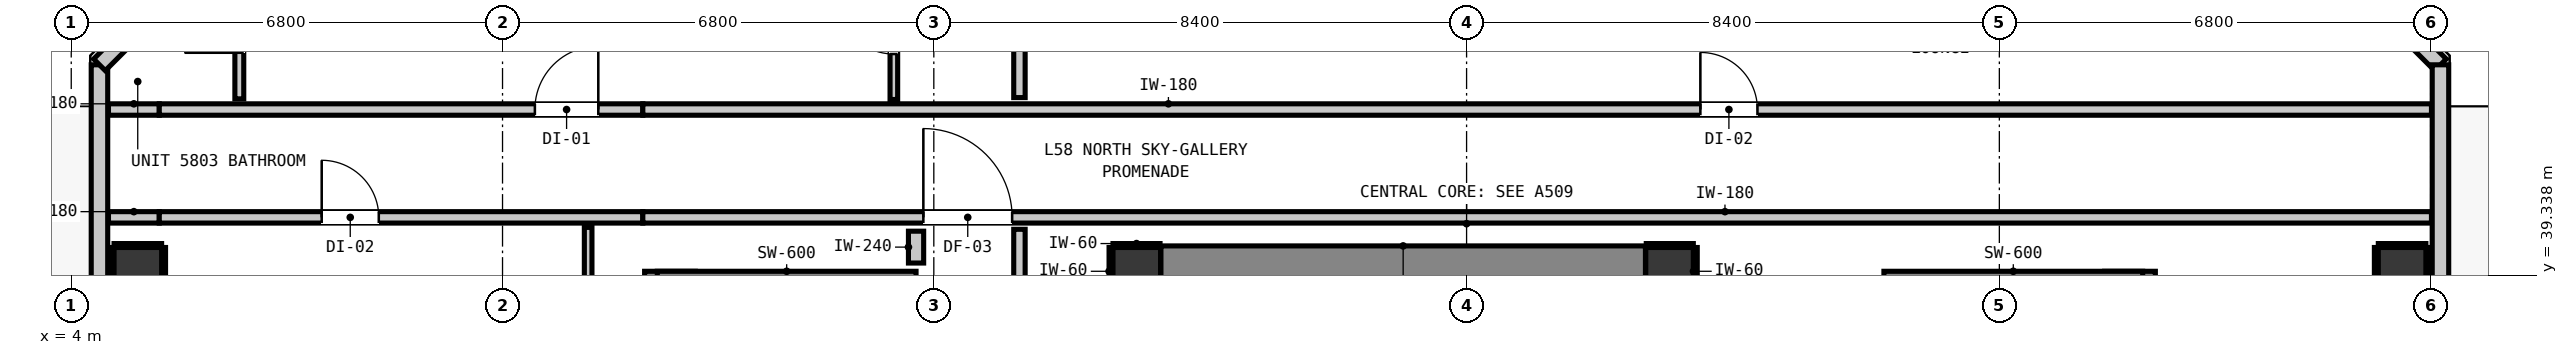
"""IFC4 building model, lengths in metres.
Left out: names, types, materials, properties, quantities, classifications, styles, units other than length and angle.
Written with IfcOpenShell. Run it as: python <this file> out.ifc"""

import sys

from ifc_helpers import new_model, si_unit, direction, frame, frame_2d, origin, origin_2d, place, context, subcontext, project, spatial, rectangle, extrude, element, fill, save


model = new_model("IFC4")
c1 = context("Model", 3, precision=1e-05, world=origin(), true_north=direction((0.0, 1.0)))
c2 = subcontext(c1, "Body", "Model", "MODEL_VIEW")
j1 = project(units=[si_unit("LENGTHUNIT", "METRE"), si_unit("PLANEANGLEUNIT", "RADIAN")], contexts=[c1])
p1 = place(None, origin())
s1 = spatial("IfcSite", under=j1, at=p1, CompositionType="ELEMENT")
p2 = place(p1, origin())
s2 = spatial("IfcBuilding", under=s1, at=p2, CompositionType="ELEMENT")
p3 = place(p2, frame((0.0, 0.0, 200.12)))
s3 = spatial("IfcBuildingStorey", under=s2, at=p3, CompositionType="ELEMENT", Elevation=200.12)
for number, where, z_axis, x_axis in (
    (1, (20.8, 39.4, 0.0), (0.0, 0.0, 1.0), (1.0, 0.0, 0.0)),
    (2, (29.2, 39.4, 0.0), (0.0, 0.0, 1.0), (1.0, 0.0, 0.0)),
):
    element("IfcColumn", number, at=place(p3, frame(where, z_axis=z_axis, x_axis=x_axis)), inside=s3, PredefinedType="COLUMN", context=c2, shape_type="SweptSolid", body=[
        extrude(rectangle(XDim=0.75, YDim=0.75, at=origin_2d()), origin(), (0.0, 0.0, 1.0), 3.32),
    ])
p4 = place(p3, frame((13.44, 31.08, 0.0), z_axis=(0.0, 0.0, 1.0), x_axis=(0.0, 1.0, 0.0)))
e3 = element("IfcWall", 3, at=p4, inside=s3, PredefinedType="SHEAR", context=c2, shape_type="SweptSolid", body=[
    extrude(rectangle(XDim=8.32, YDim=0.8, at=frame_2d((4.16, 0.0))), origin(), (0.0, 0.0, 1.0), 3.32),
])
p5 = place(p3, frame((13.24, 39.1, 0.0), z_axis=(0.0, 0.0, 1.0), x_axis=(1.0, 0.0, 0.0)))
e4 = element("IfcWall", 4, at=p5, inside=s3, PredefinedType="SHEAR", context=c2, shape_type="SweptSolid", body=[
    extrude(rectangle(XDim=4.08, YDim=0.6, at=frame_2d((2.04, 0.0))), origin(), (0.0, 0.0, 1.0), 3.32),
])
p6 = place(p3, frame((36.46, 31.08, 0.0), z_axis=(0.0, 0.0, 1.0), x_axis=(0.0, 1.0, 0.0)))
e5 = element("IfcWall", 5, at=p6, inside=s3, PredefinedType="SHEAR", context=c2, shape_type="SweptSolid", body=[
    extrude(rectangle(XDim=8.32, YDim=0.8, at=frame_2d((4.16, 0.0))), origin(), (0.0, 0.0, 1.0), 3.32),
])
p7 = place(p3, frame((32.58, 39.1, 0.0), z_axis=(0.0, 0.0, 1.0), x_axis=(1.0, 0.0, 0.0)))
e6 = element("IfcWall", 6, at=p7, inside=s3, PredefinedType="SHEAR", context=c2, shape_type="SweptSolid", body=[
    extrude(rectangle(XDim=4.08, YDim=0.6, at=frame_2d((2.04, 0.0))), origin(), (0.0, 0.0, 1.0), 3.32),
])
p8 = place(p3, frame((21.18, 39.4, 0.0), z_axis=(0.0, 0.0, 1.0), x_axis=(1.0, 0.0, 0.0)))
e7 = element("IfcWall", 7, at=p8, inside=s3, PredefinedType="SHEAR", context=c2, shape_type="SweptSolid", body=[
    extrude(rectangle(XDim=7.64, YDim=0.8, at=frame_2d((3.82, 0.0))), origin(), (0.0, 0.0, 1.0), 3.32),
])
for number, where, z_axis, x_axis in (
    (8, (5.05, 39.4, 0.0), (0.0, 0.0, 1.0), (1.0, 0.0, 0.0)),
    (9, (40.75, 39.4, 0.0), (0.0, 0.0, 1.0), (1.0, 0.0, 0.0)),
):
    element("IfcColumn", number, at=place(p3, frame(where, z_axis=z_axis, x_axis=x_axis)), inside=s3, PredefinedType="COLUMN", context=c2, shape_type="SweptSolid", body=[
        extrude(rectangle(XDim=0.75, YDim=0.75, at=origin_2d()), origin(), (0.0, 0.0, 1.0), 3.32),
    ])
p9 = place(p3, frame((4.445, 12.345, 0.0), z_axis=(0.0, 0.0, 1.0), x_axis=(0.0, 1.0, 0.0)))
e10 = element("IfcWall", 10, at=p9, inside=s3, PredefinedType="STANDARD", context=c2, shape_type="SweptSolid", body=[
    extrude(rectangle(XDim=30.31, YDim=0.26, at=frame_2d((15.155, 0.0))), origin(), (0.0, 0.0, 1.0), 3.1),
])
p10 = place(p9, frame((0.91, 0.0, 0.0)))
e11 = element("IfcOpeningElement", 11, at=p10, cuts=e10, PredefinedType="OPENING", context=c2, shape_type="SweptSolid", body=[
    extrude(rectangle(XDim=1.0, YDim=2.15, at=frame_2d((0.5, 1.075))), frame((0.0, 0.14, 0.0), z_axis=(0.0, -1.0, 0.0), x_axis=(1.0, 0.0, 0.0)), (0.0, 0.0, 1.0), 0.28),
])
p11 = place(p9, frame((2.322, 0.0, 0.85)))
e12 = element("IfcOpeningElement", 12, at=p11, cuts=e10, PredefinedType="OPENING", context=c2, shape_type="SweptSolid", body=[
    extrude(rectangle(XDim=0.58, YDim=1.5, at=frame_2d((0.29, 0.75))), frame((0.0, 0.14, 0.0), z_axis=(0.0, -1.0, 0.0), x_axis=(1.0, 0.0, 0.0)), (0.0, 0.0, 1.0), 0.28),
])
p12 = place(p9, frame((21.205, 0.0, 0.85)))
e13 = element("IfcOpeningElement", 13, at=p12, cuts=e10, PredefinedType="OPENING", context=c2, shape_type="SweptSolid", body=[
    extrude(rectangle(XDim=3.0, YDim=2.1, at=frame_2d((1.5, 1.05))), frame((0.0, 0.14, 0.0), z_axis=(0.0, -1.0, 0.0), x_axis=(1.0, 0.0, 0.0)), (0.0, 0.0, 1.0), 0.28),
])
for number, where, z_axis, x_axis in (
    (14, (4.445, 42.655, 0.0), (0.0, 0.0, 1.0), (0.707, 0.707, 0.0)),
    (15, (39.255, 44.755, 0.0), (0.0, 0.0, 1.0), (0.707, -0.707, 0.0)),
):
    element("IfcWall", number, at=place(p3, frame(where, z_axis=z_axis, x_axis=x_axis)), inside=s3, PredefinedType="STANDARD", context=c2, shape_type="SweptSolid", body=[
        extrude(rectangle(XDim=2.97, YDim=0.26, at=frame_2d((1.485, 0.0))), origin(), (0.0, 0.0, 1.0), 3.1),
    ])
p13 = place(p3, frame((41.355, 42.655, 0.0), z_axis=(0.0, 0.0, 1.0), x_axis=(0.0, -1.0, 0.0)))
e16 = element("IfcWall", 16, at=p13, inside=s3, PredefinedType="STANDARD", context=c2, shape_type="SweptSolid", body=[
    extrude(rectangle(XDim=30.31, YDim=0.26, at=frame_2d((15.155, 0.0))), origin(), (0.0, 0.0, 1.0), 3.1),
])
p14 = place(p13, frame((23.818, 0.0, 0.0)))
e17 = element("IfcOpeningElement", 17, at=p14, cuts=e16, PredefinedType="OPENING", context=c2, shape_type="SweptSolid", body=[
    extrude(rectangle(XDim=1.0, YDim=2.15, at=frame_2d((0.5, 1.075))), frame((0.0, 0.14, 0.0), z_axis=(0.0, -1.0, 0.0), x_axis=(1.0, 0.0, 0.0)), (0.0, 0.0, 1.0), 0.28),
])
p15 = place(p13, frame((25.482, 0.0, 0.85)))
e18 = element("IfcOpeningElement", 18, at=p15, cuts=e16, PredefinedType="OPENING", context=c2, shape_type="SweptSolid", body=[
    extrude(rectangle(XDim=1.05, YDim=1.65, at=frame_2d((0.525, 0.825))), frame((0.0, 0.14, 0.0), z_axis=(0.0, -1.0, 0.0), x_axis=(1.0, 0.0, 0.0)), (0.0, 0.0, 1.0), 0.28),
])
p16 = place(p13, frame((28.183, 0.0, 0.85)))
e19 = element("IfcOpeningElement", 19, at=p16, cuts=e16, PredefinedType="OPENING", context=c2, shape_type="SweptSolid", body=[
    extrude(rectangle(XDim=1.05, YDim=1.65, at=frame_2d((0.525, 0.825))), frame((0.0, 0.14, 0.0), z_axis=(0.0, -1.0, 0.0), x_axis=(1.0, 0.0, 0.0)), (0.0, 0.0, 1.0), 0.28),
])
p17 = place(p3, frame((4.587, 40.25, 0.0), z_axis=(0.0, 0.0, 1.0), x_axis=(1.0, 0.0, 0.0)))
e20 = element("IfcWall", 20, at=p17, inside=s3, PredefinedType="PARTITIONING", context=c2, shape_type="SweptSolid", body=[
    extrude(rectangle(XDim=0.801, YDim=0.18, at=frame_2d((0.4, 0.0))), origin(), (0.0, 0.0, 1.0), 3.1),
])
p18 = place(p3, frame((5.388, 40.25, 0.0), z_axis=(0.0, 0.0, 1.0), x_axis=(1.0, 0.0, 0.0)))
e21 = element("IfcWall", 21, at=p18, inside=s3, PredefinedType="PARTITIONING", context=c2, shape_type="SweptSolid", body=[
    extrude(rectangle(XDim=7.624, YDim=0.18, at=frame_2d((3.812, 0.0))), origin(), (0.0, 0.0, 1.0), 2.477),
])
p19 = place(p18, frame((2.561, 0.0, 0.0)))
e22 = element("IfcOpeningElement", 22, at=p19, cuts=e21, PredefinedType="OPENING", context=c2, shape_type="SweptSolid", body=[
    extrude(rectangle(XDim=0.9, YDim=2.1, at=frame_2d((0.45, 1.05))), frame((0.0, 0.1, 0.0), z_axis=(0.0, -1.0, 0.0), x_axis=(1.0, 0.0, 0.0)), (0.0, 0.0, 1.0), 0.2),
])
p20 = place(p3, frame((13.012, 40.25, 0.0), z_axis=(0.0, 0.0, 1.0), x_axis=(1.0, 0.0, 0.0)))
e23 = element("IfcWall", 23, at=p20, inside=s3, PredefinedType="PARTITIONING", context=c2, shape_type="SweptSolid", body=[
    extrude(rectangle(XDim=28.201, YDim=0.18, at=frame_2d((14.101, 0.0))), origin(), (0.0, 0.0, 1.0), 3.1),
])
p21 = place(p20, frame((4.423, 0.0, 0.0)))
e24 = element("IfcOpeningElement", 24, at=p21, cuts=e23, PredefinedType="OPENING", context=c2, shape_type="SweptSolid", body=[
    extrude(rectangle(XDim=1.4, YDim=2.15, at=frame_2d((0.7, 1.075))), frame((0.0, 0.1, 0.0), z_axis=(0.0, -1.0, 0.0), x_axis=(1.0, 0.0, 0.0)), (0.0, 0.0, 1.0), 0.2),
])
p22 = place(p3, frame((4.587, 41.95, 0.0), z_axis=(0.0, 0.0, 1.0), x_axis=(1.0, 0.0, 0.0)))
e25 = element("IfcWall", 25, at=p22, inside=s3, PredefinedType="PARTITIONING", context=c2, shape_type="SweptSolid", body=[
    extrude(rectangle(XDim=0.801, YDim=0.18, at=frame_2d((0.4, 0.0))), origin(), (0.0, 0.0, 1.0), 3.1),
])
p23 = place(p3, frame((5.388, 41.95, 0.0), z_axis=(0.0, 0.0, 1.0), x_axis=(1.0, 0.0, 0.0)))
e26 = element("IfcWall", 26, at=p23, inside=s3, PredefinedType="PARTITIONING", context=c2, shape_type="SweptSolid", body=[
    extrude(rectangle(XDim=7.624, YDim=0.18, at=frame_2d((3.812, 0.0))), origin(), (0.0, 0.0, 1.0), 2.477),
])
p24 = place(p23, frame((5.922, 0.0, 0.0)))
e27 = element("IfcOpeningElement", 27, at=p24, cuts=e26, PredefinedType="OPENING", context=c2, shape_type="SweptSolid", body=[
    extrude(rectangle(XDim=1.0, YDim=2.15, at=frame_2d((0.5, 1.075))), frame((0.0, 0.1, 0.0), z_axis=(0.0, -1.0, 0.0), x_axis=(1.0, 0.0, 0.0)), (0.0, 0.0, 1.0), 0.2),
])
p25 = place(p3, frame((13.012, 41.95, 0.0), z_axis=(0.0, 0.0, 1.0), x_axis=(1.0, 0.0, 0.0)))
e28 = element("IfcWall", 28, at=p25, inside=s3, PredefinedType="PARTITIONING", context=c2, shape_type="SweptSolid", body=[
    extrude(rectangle(XDim=28.201, YDim=0.18, at=frame_2d((14.101, 0.0))), origin(), (0.0, 0.0, 1.0), 3.1),
])
p26 = place(p25, frame((16.674, 0.0, 0.0)))
e29 = element("IfcOpeningElement", 29, at=p26, cuts=e28, PredefinedType="OPENING", context=c2, shape_type="SweptSolid", body=[
    extrude(rectangle(XDim=0.9, YDim=2.1, at=frame_2d((0.45, 1.05))), frame((0.0, 0.1, 0.0), z_axis=(0.0, -1.0, 0.0), x_axis=(1.0, 0.0, 0.0)), (0.0, 0.0, 1.0), 0.2),
])
p27 = place(p3, frame((17.32, 39.53, 0.0), z_axis=(0.0, 0.0, 1.0), x_axis=(0.0, 1.0, 0.0)))
e30 = element("IfcWall", 30, at=p27, inside=s3, PredefinedType="PARTITIONING", context=c2, shape_type="SweptSolid", body=[
    extrude(rectangle(XDim=0.502, YDim=0.24, at=frame_2d((0.251, 0.0))), origin(), (0.0, 0.0, 1.0), 3.1),
])
p28 = place(p3, frame((18.95, 39.058, 0.0), z_axis=(0.0, 0.0, 1.0), x_axis=(0.0, 1.0, 0.0)))
e31 = element("IfcWall", 31, at=p28, inside=s3, PredefinedType="PARTITIONING", context=c2, shape_type="SweptSolid", body=[
    extrude(rectangle(XDim=1.004, YDim=0.18, at=frame_2d((0.502, 0.0))), origin(), (0.0, 0.0, 1.0), 3.1),
])
p29 = place(p3, frame((18.95, 42.138, 0.0), z_axis=(0.0, 0.0, 1.0), x_axis=(0.0, 1.0, 0.0)))
e32 = element("IfcWall", 32, at=p29, inside=s3, PredefinedType="PARTITIONING", context=c2, shape_type="SweptSolid", body=[
    extrude(rectangle(XDim=2.475, YDim=0.18, at=frame_2d((1.238, 0.0))), origin(), (0.0, 0.0, 1.0), 3.1),
])
p30 = place(p3, frame((6.65, 42.118, 0.0), z_axis=(0.0, 0.0, 1.0), x_axis=(0.0, 1.0, 0.0)))
e33 = element("IfcWall", 33, at=p30, inside=s3, PredefinedType="PARTITIONING", context=c2, shape_type="SweptSolid", body=[
    extrude(rectangle(XDim=2.495, YDim=0.14, at=frame_2d((1.248, 0.0))), origin(), (0.0, 0.0, 1.0), 3.1),
])
p31 = place(p30, frame((0.727, 0.0, 0.0)))
e34 = element("IfcOpeningElement", 34, at=p31, cuts=e33, PredefinedType="OPENING", context=c2, shape_type="SweptSolid", body=[
    extrude(rectangle(XDim=0.86, YDim=2.02, at=frame_2d((0.43, 1.01))), frame((0.0, 0.08, 0.0), z_axis=(0.0, -1.0, 0.0), x_axis=(1.0, 0.0, 0.0)), (0.0, 0.0, 1.0), 0.16),
])
p32 = place(p3, frame((12.15, 29.938, 0.0), z_axis=(0.0, 0.0, 1.0), x_axis=(0.0, 1.0, 0.0)))
e35 = element("IfcWall", 35, at=p32, inside=s3, PredefinedType="PARTITIONING", context=c2, shape_type="SweptSolid", body=[
    extrude(rectangle(XDim=10.154, YDim=0.12, at=frame_2d((5.077, 0.0))), origin(), (0.0, 0.0, 1.0), 3.1),
])
p33 = place(p3, frame((16.97, 42.108, 0.0), z_axis=(0.0, 0.0, 1.0), x_axis=(0.0, 1.0, 0.0)))
e36 = element("IfcWall", 36, at=p33, inside=s3, PredefinedType="PARTITIONING", context=c2, shape_type="SweptSolid", body=[
    extrude(rectangle(XDim=2.505, YDim=0.12, at=frame_2d((1.252, 0.0))), origin(), (0.0, 0.0, 1.0), 3.1),
])
p34 = place(p33, frame((0.717, 0.0, 0.0)))
e37 = element("IfcOpeningElement", 37, at=p34, cuts=e36, PredefinedType="OPENING", context=c2, shape_type="SweptSolid", body=[
    extrude(rectangle(XDim=0.9, YDim=2.1, at=frame_2d((0.45, 1.05))), frame((0.0, 0.07, 0.0), z_axis=(0.0, -1.0, 0.0), x_axis=(1.0, 0.0, 0.0)), (0.0, 0.0, 1.0), 0.14),
])
p35 = place(p3, frame((20.425, 39.807, 0.0), z_axis=(0.0, 0.0, 1.0), x_axis=(1.0, 0.0, 0.0)))
e38 = element("IfcWall", 38, at=p35, inside=s3, PredefinedType="PARTITIONING", context=c2, shape_type="SweptSolid", body=[
    extrude(rectangle(XDim=0.742, YDim=0.06, at=frame_2d((0.371, 0.0))), origin(), (0.0, 0.0, 1.0), 1.45),
])
p36 = place(p3, frame((20.393, 39.025, 0.0), z_axis=(0.0, 0.0, 1.0), x_axis=(0.0, 1.0, 0.0)))
e39 = element("IfcWall", 39, at=p36, inside=s3, PredefinedType="PARTITIONING", context=c2, shape_type="SweptSolid", body=[
    extrude(rectangle(XDim=0.75, YDim=0.06, at=frame_2d((0.375, 0.0))), origin(), (0.0, 0.0, 1.0), 1.45),
])
p37 = place(p3, frame((28.833, 39.807, 0.0), z_axis=(0.0, 0.0, 1.0), x_axis=(1.0, 0.0, 0.0)))
e40 = element("IfcWall", 40, at=p37, inside=s3, PredefinedType="PARTITIONING", context=c2, shape_type="SweptSolid", body=[
    extrude(rectangle(XDim=0.742, YDim=0.06, at=frame_2d((0.371, 0.0))), origin(), (0.0, 0.0, 1.0), 1.45),
])
for number, where, z_axis, x_axis in (
    (41, (29.607, 39.025, 0.0), (0.0, 0.0, 1.0), (0.0, 1.0, 0.0)),
    (42, (4.675, 39.807, 0.0), (0.0, 0.0, 1.0), (1.0, 0.0, 0.0)),
    (43, (4.643, 39.025, 0.0), (0.0, 0.0, 1.0), (0.0, 1.0, 0.0)),
    (44, (5.457, 39.025, 0.0), (0.0, 0.0, 1.0), (0.0, 1.0, 0.0)),
    (45, (40.375, 39.807, 0.0), (0.0, 0.0, 1.0), (1.0, 0.0, 0.0)),
    (46, (40.343, 39.025, 0.0), (0.0, 0.0, 1.0), (0.0, 1.0, 0.0)),
    (47, (41.157, 39.025, 0.0), (0.0, 0.0, 1.0), (0.0, 1.0, 0.0)),
):
    element("IfcWall", number, at=place(p3, frame(where, z_axis=z_axis, x_axis=x_axis)), inside=s3, PredefinedType="PARTITIONING", context=c2, shape_type="SweptSolid", body=[
        extrude(rectangle(XDim=0.75, YDim=0.06, at=frame_2d((0.375, 0.0))), origin(), (0.0, 0.0, 1.0), 1.45),
    ])
p38 = place(p21, origin())
e48 = element("IfcDoor", 48, at=p38, inside=s3, OperationType="SINGLE_SWING_LEFT", PredefinedType="DOOR", context=c2, shape_type="SweptSolid", body=[
    extrude(rectangle(XDim=1.4, YDim=2.15, at=frame_2d((0.7, 1.075))), frame((0.0, 0.025, 0.0), z_axis=(0.0, -1.0, 0.0), x_axis=(1.0, 0.0, 0.0)), (0.0, 0.0, 1.0), 0.05),
])
fill(e24, e48)
p39 = place(p24, origin())
e49 = element("IfcDoor", 49, at=p39, inside=s3, OperationType="SINGLE_SWING_RIGHT", PredefinedType="DOOR", context=c2, shape_type="SweptSolid", body=[
    extrude(rectangle(XDim=1.0, YDim=2.15, at=frame_2d((0.5, 1.075))), frame((0.0, 0.025, 0.0), z_axis=(0.0, -1.0, 0.0), x_axis=(1.0, 0.0, 0.0)), (0.0, 0.0, 1.0), 0.05),
])
fill(e27, e49)
p40 = place(p31, origin())
e50 = element("IfcDoor", 50, at=p40, inside=s3, OperationType="SINGLE_SWING_LEFT", PredefinedType="DOOR", context=c2, shape_type="SweptSolid", body=[
    extrude(rectangle(XDim=0.86, YDim=2.02, at=frame_2d((0.43, 1.01))), frame((0.0, 0.025, 0.0), z_axis=(0.0, -1.0, 0.0), x_axis=(1.0, 0.0, 0.0)), (0.0, 0.0, 1.0), 0.05),
])
fill(e34, e50)
p41 = place(p34, origin())
e51 = element("IfcDoor", 51, at=p41, inside=s3, OperationType="SINGLE_SWING_RIGHT", PredefinedType="DOOR", context=c2, shape_type="SweptSolid", body=[
    extrude(rectangle(XDim=0.9, YDim=2.1, at=frame_2d((0.45, 1.05))), frame((0.0, 0.025, 0.0), z_axis=(0.0, -1.0, 0.0), x_axis=(1.0, 0.0, 0.0)), (0.0, 0.0, 1.0), 0.05),
])
fill(e37, e51)
p42 = place(p26, origin())
e52 = element("IfcDoor", 52, at=p42, inside=s3, OperationType="SINGLE_SWING_LEFT", PredefinedType="DOOR", context=c2, shape_type="SweptSolid", body=[
    extrude(rectangle(XDim=0.9, YDim=2.1, at=frame_2d((0.45, 1.05))), frame((0.0, 0.025, 0.0), z_axis=(0.0, -1.0, 0.0), x_axis=(1.0, 0.0, 0.0)), (0.0, 0.0, 1.0), 0.05),
])
fill(e29, e52)
p43 = place(p19, origin())
e53 = element("IfcDoor", 53, at=p43, inside=s3, OperationType="SINGLE_SWING_LEFT", PredefinedType="DOOR", context=c2, shape_type="SweptSolid", body=[
    extrude(rectangle(XDim=0.9, YDim=2.1, at=frame_2d((0.45, 1.05))), frame((0.0, 0.025, 0.0), z_axis=(0.0, -1.0, 0.0), x_axis=(1.0, 0.0, 0.0)), (0.0, 0.0, 1.0), 0.05),
])
fill(e22, e53)
save(model, sys.argv[1])
